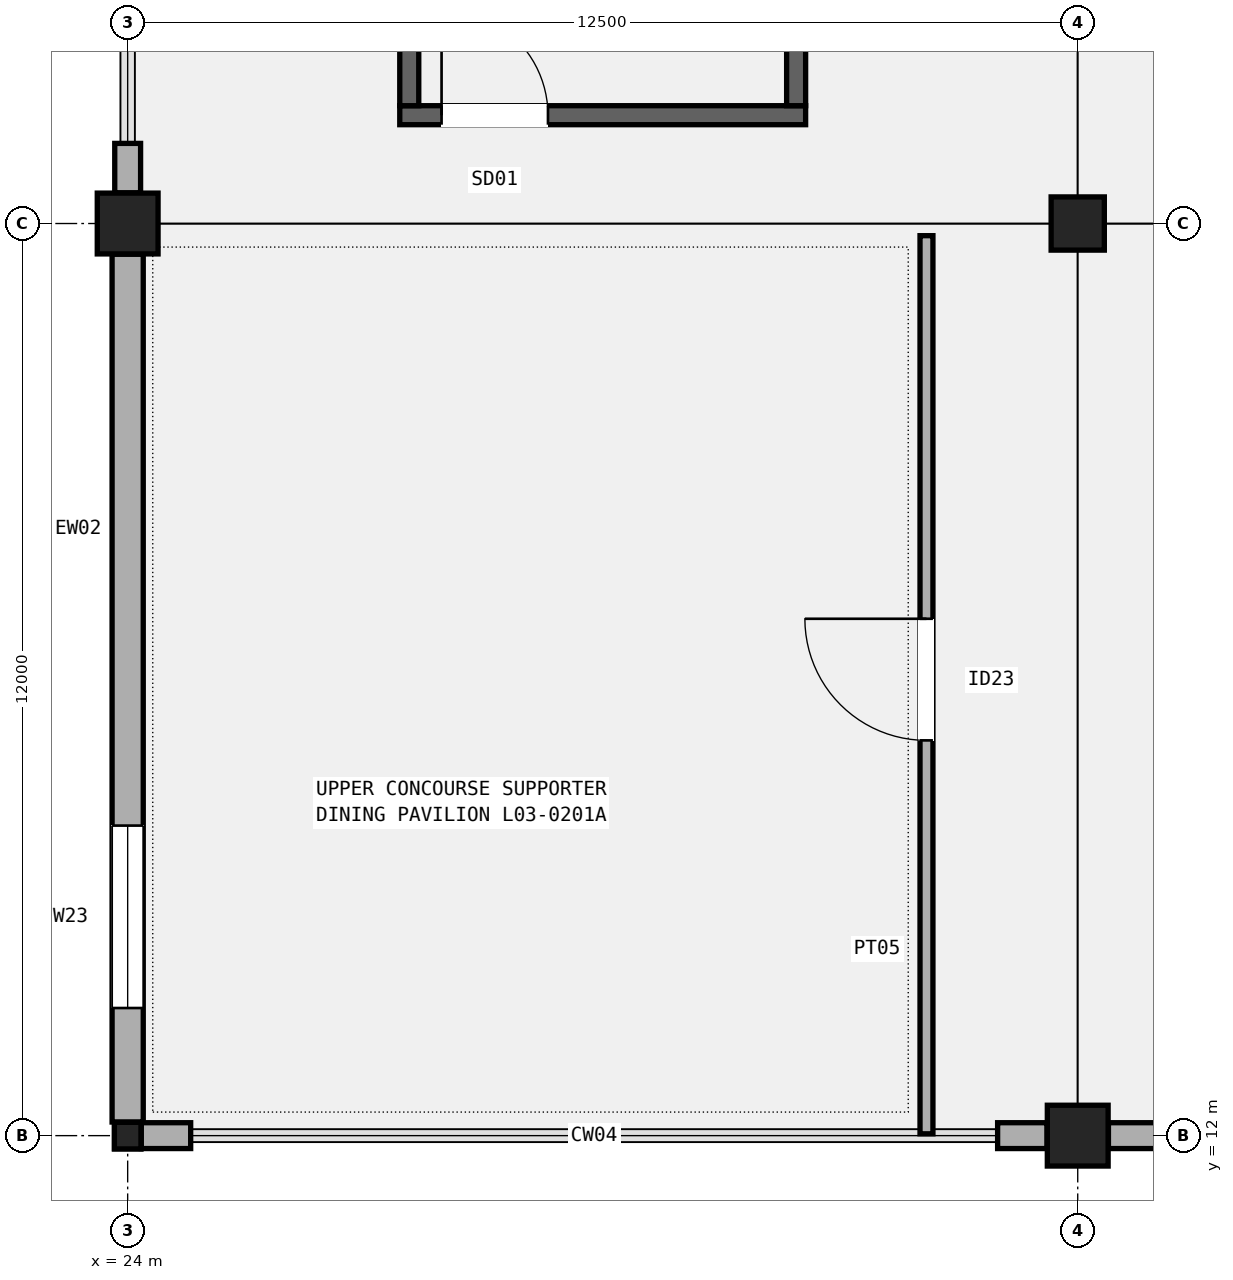
"""IFC4 building model, lengths in metres.
Left out: names, types, materials, properties, quantities, classifications, styles, units other than length and angle.
Written with IfcOpenShell. Run it as: python <this file> out.ifc"""

import sys

from ifc_helpers import new_model, si_unit, direction, frame, frame_2d, origin, origin_2d, place, context, subcontext, project, spatial, rectangle, hollow_rectangle, extrude, element, fill, save


model = new_model("IFC4")
c1 = context("Model", 3, precision=1e-05, world=origin(), true_north=direction((0.0, 1.0)))
c2 = subcontext(c1, "Body", "Model", "MODEL_VIEW")
j1 = project(units=[si_unit("LENGTHUNIT", "METRE"), si_unit("PLANEANGLEUNIT", "RADIAN")], contexts=[c1])
p1 = place(None, origin())
s1 = spatial("IfcSite", under=j1, at=p1, CompositionType="ELEMENT")
p2 = place(p1, origin())
s2 = spatial("IfcBuilding", under=s1, at=p2, CompositionType="ELEMENT")
p3 = place(p2, frame((0.0, 0.0, 15.3)))
s3 = spatial("IfcBuildingStorey", under=s2, at=p3, CompositionType="ELEMENT", Elevation=15.3)
p4 = place(p3, frame((24.0, 12.0, 0.0), z_axis=(0.0, 0.0, 1.0), x_axis=(1.0, 0.0, 0.0)))
e1 = element("IfcColumn", 1, at=p4, inside=s3, PredefinedType="COLUMN", context=c2, shape_type="SweptSolid", body=[
    extrude(hollow_rectangle(XDim=0.35, YDim=0.35, WallThickness=0.016, InnerFilletRadius=0.016, OuterFilletRadius=0.032, at=origin_2d()), origin(), (0.0, 0.0, 1.0), 5.1),
])
for number, where, z_axis, x_axis in (
    (2, (24.0, 24.0, 0.0), (0.0, 0.0, 1.0), (1.0, 0.0, 0.0)),
    (3, (36.5, 12.0, 0.0), (0.0, 0.0, 1.0), (1.0, 0.0, 0.0)),
):
    element("IfcColumn", number, at=place(p3, frame(where, z_axis=z_axis, x_axis=x_axis)), inside=s3, PredefinedType="COLUMN", context=c2, shape_type="SweptSolid", body=[
        extrude(rectangle(XDim=0.8, YDim=0.8, at=origin_2d()), origin(), (0.0, 0.0, 1.0), 5.1),
    ])
p5 = place(p3, frame((36.5, 24.0, 0.0), z_axis=(0.0, 0.0, 1.0), x_axis=(1.0, 0.0, 0.0)))
e4 = element("IfcColumn", 4, at=p5, inside=s3, PredefinedType="COLUMN", context=c2, shape_type="SweptSolid", body=[
    extrude(rectangle(XDim=0.7, YDim=0.7, at=origin_2d()), origin(), (0.0, 0.0, 1.0), 5.1),
])
p6 = place(p3, frame((24.179, 12.0, 0.0), z_axis=(0.0, 0.0, 1.0), x_axis=(1.0, 0.0, 0.0)))
e5 = element("IfcWall", 5, at=p6, inside=s3, PredefinedType="SOLIDWALL", context=c2, shape_type="SweptSolid", body=[
    extrude(rectangle(XDim=0.65, YDim=0.34, at=frame_2d((0.325, 0.0))), origin(), (0.0, 0.0, 1.0), 4.06),
])
p7 = place(p3, frame((35.446, 12.0, 0.0), z_axis=(0.0, 0.0, 1.0), x_axis=(1.0, 0.0, 0.0)))
e6 = element("IfcWall", 6, at=p7, inside=s3, PredefinedType="SOLIDWALL", context=c2, shape_type="SweptSolid", body=[
    extrude(rectangle(XDim=0.65, YDim=0.34, at=frame_2d((0.325, 0.0))), origin(), (0.0, 0.0, 1.0), 4.06),
])
p8 = place(p3, frame((24.0, 12.179, 0.0), z_axis=(0.0, 0.0, 1.0), x_axis=(0.0, 1.0, 0.0)))
e7 = element("IfcWall", 7, at=p8, inside=s3, PredefinedType="SOLIDWALL", context=c2, shape_type="SweptSolid", body=[
    extrude(rectangle(XDim=11.417, YDim=0.41, at=frame_2d((5.708, 0.0))), origin(), (0.0, 0.0, 1.0), 4.06),
])
p9 = place(p8, frame((1.5, 0.0, 0.95)))
e8 = element("IfcOpeningElement", 8, at=p9, cuts=e7, PredefinedType="OPENING", context=c2, shape_type="SweptSolid", body=[
    extrude(rectangle(XDim=2.4, YDim=1.65, at=frame_2d((1.2, 0.825))), frame((0.0, 0.215, 0.0), z_axis=(0.0, -1.0, 0.0), x_axis=(1.0, 0.0, 0.0)), (0.0, 0.0, 1.0), 0.43),
])
p10 = place(p3, frame((24.0, 24.404, 0.0), z_axis=(0.0, 0.0, 1.0), x_axis=(0.0, 1.0, 0.0)))
e9 = element("IfcWall", 9, at=p10, inside=s3, PredefinedType="SOLIDWALL", context=c2, shape_type="SweptSolid", body=[
    extrude(rectangle(XDim=0.65, YDim=0.34, at=frame_2d((0.325, 0.0))), origin(), (0.0, 0.0, 1.0), 4.16),
])
p11 = place(p3, frame((36.904, 12.0, 0.0), z_axis=(0.0, 0.0, 1.0), x_axis=(1.0, 0.0, 0.0)))
e10 = element("IfcWall", 10, at=p11, inside=s3, PredefinedType="SOLIDWALL", context=c2, shape_type="SweptSolid", body=[
    extrude(rectangle(XDim=11.742, YDim=0.34, at=frame_2d((5.871, 0.0))), origin(), (0.0, 0.0, 1.0), 4.16),
])
p12 = place(p11, frame((1.5, 0.0, 0.95)))
e11 = element("IfcOpeningElement", 11, at=p12, cuts=e10, PredefinedType="OPENING", context=c2, shape_type="SweptSolid", body=[
    extrude(rectangle(XDim=3.0, YDim=1.7, at=frame_2d((1.5, 0.85))), frame((0.0, 0.18, 0.0), z_axis=(0.0, -1.0, 0.0), x_axis=(1.0, 0.0, 0.0)), (0.0, 0.0, 1.0), 0.36),
])
p13 = place(p3, frame((27.58, 25.425, 0.0), z_axis=(0.0, 0.0, 1.0), x_axis=(1.0, 0.0, 0.0)))
e12 = element("IfcWall", 12, at=p13, inside=s3, PredefinedType="SHEAR", context=c2, shape_type="SweptSolid", body=[
    extrude(rectangle(XDim=5.34, YDim=0.25, at=frame_2d((2.67, 0.0))), origin(), (0.0, 0.0, 1.0), 4.86),
])
p14 = place(p13, frame((0.55, 0.0, 0.0)))
e13 = element("IfcOpeningElement", 13, at=p14, cuts=e12, PredefinedType="OPENING", context=c2, shape_type="SweptSolid", body=[
    extrude(rectangle(XDim=1.4, YDim=2.15, at=frame_2d((0.7, 1.075))), frame((0.0, 0.135, 0.0), z_axis=(0.0, -1.0, 0.0), x_axis=(1.0, 0.0, 0.0)), (0.0, 0.0, 1.0), 0.27),
])
for number, where, z_axis, x_axis in (
    (14, (27.705, 25.55, 0.0), (0.0, 0.0, 1.0), (0.0, 1.0, 0.0)),
    (15, (32.795, 25.55, 0.0), (0.0, 0.0, 1.0), (0.0, 1.0, 0.0)),
):
    element("IfcWall", number, at=place(p3, frame(where, z_axis=z_axis, x_axis=x_axis)), inside=s3, PredefinedType="SHEAR", context=c2, shape_type="SweptSolid", body=[
        extrude(rectangle(XDim=8.9, YDim=0.25, at=frame_2d((4.45, 0.0))), origin(), (0.0, 0.0, 1.0), 4.86),
    ])
p15 = place(p3, frame((34.51, 12.024, 0.0), z_axis=(0.0, 0.0, 1.0), x_axis=(0.0, 1.0, 0.0)))
e16 = element("IfcWall", 16, at=p15, inside=s3, PredefinedType="PARTITIONING", context=c2, shape_type="SweptSolid", body=[
    extrude(rectangle(XDim=11.816, YDim=0.17, at=frame_2d((5.908, 0.0))), origin(), (0.0, 0.0, 1.0), 4.22),
])
p16 = place(p15, frame((5.176, 0.0, 0.0)))
e17 = element("IfcOpeningElement", 17, at=p16, cuts=e16, PredefinedType="OPENING", context=c2, shape_type="SweptSolid", body=[
    extrude(rectangle(XDim=1.6, YDim=2.3, at=frame_2d((0.8, 1.15))), frame((0.0, 0.095, 0.0), z_axis=(0.0, -1.0, 0.0), x_axis=(1.0, 0.0, 0.0)), (0.0, 0.0, 1.0), 0.19),
])
p17 = place(p9, origin())
e18 = element("IfcWindow", 18, at=p17, inside=s3, PartitioningType="SINGLE_PANEL", PredefinedType="WINDOW", context=c2, shape_type="SweptSolid", body=[
    extrude(rectangle(XDim=2.4, YDim=1.65, at=frame_2d((1.2, 0.825))), frame((0.0, 0.03, 0.0), z_axis=(0.0, -1.0, 0.0), x_axis=(1.0, 0.0, 0.0)), (0.0, 0.0, 1.0), 0.06),
])
fill(e8, e18)
p18 = place(p14, origin())
e19 = element("IfcDoor", 19, at=p18, inside=s3, OperationType="SINGLE_SWING_LEFT", PredefinedType="DOOR", context=c2, shape_type="SweptSolid", body=[
    extrude(rectangle(XDim=1.4, YDim=2.15, at=frame_2d((0.7, 1.075))), frame((0.0, 0.025, 0.0), z_axis=(0.0, -1.0, 0.0), x_axis=(1.0, 0.0, 0.0)), (0.0, 0.0, 1.0), 0.05),
])
fill(e13, e19)
p19 = place(p16, origin())
e20 = element("IfcDoor", 20, at=p19, inside=s3, OperationType="SINGLE_SWING_RIGHT", PredefinedType="DOOR", context=c2, shape_type="SweptSolid", body=[
    extrude(rectangle(XDim=1.6, YDim=2.3, at=frame_2d((0.8, 1.15))), frame((0.0, 0.025, 0.0), z_axis=(0.0, -1.0, 0.0), x_axis=(1.0, 0.0, 0.0)), (0.0, 0.0, 1.0), 0.05),
])
fill(e17, e20)
save(model, sys.argv[1])
